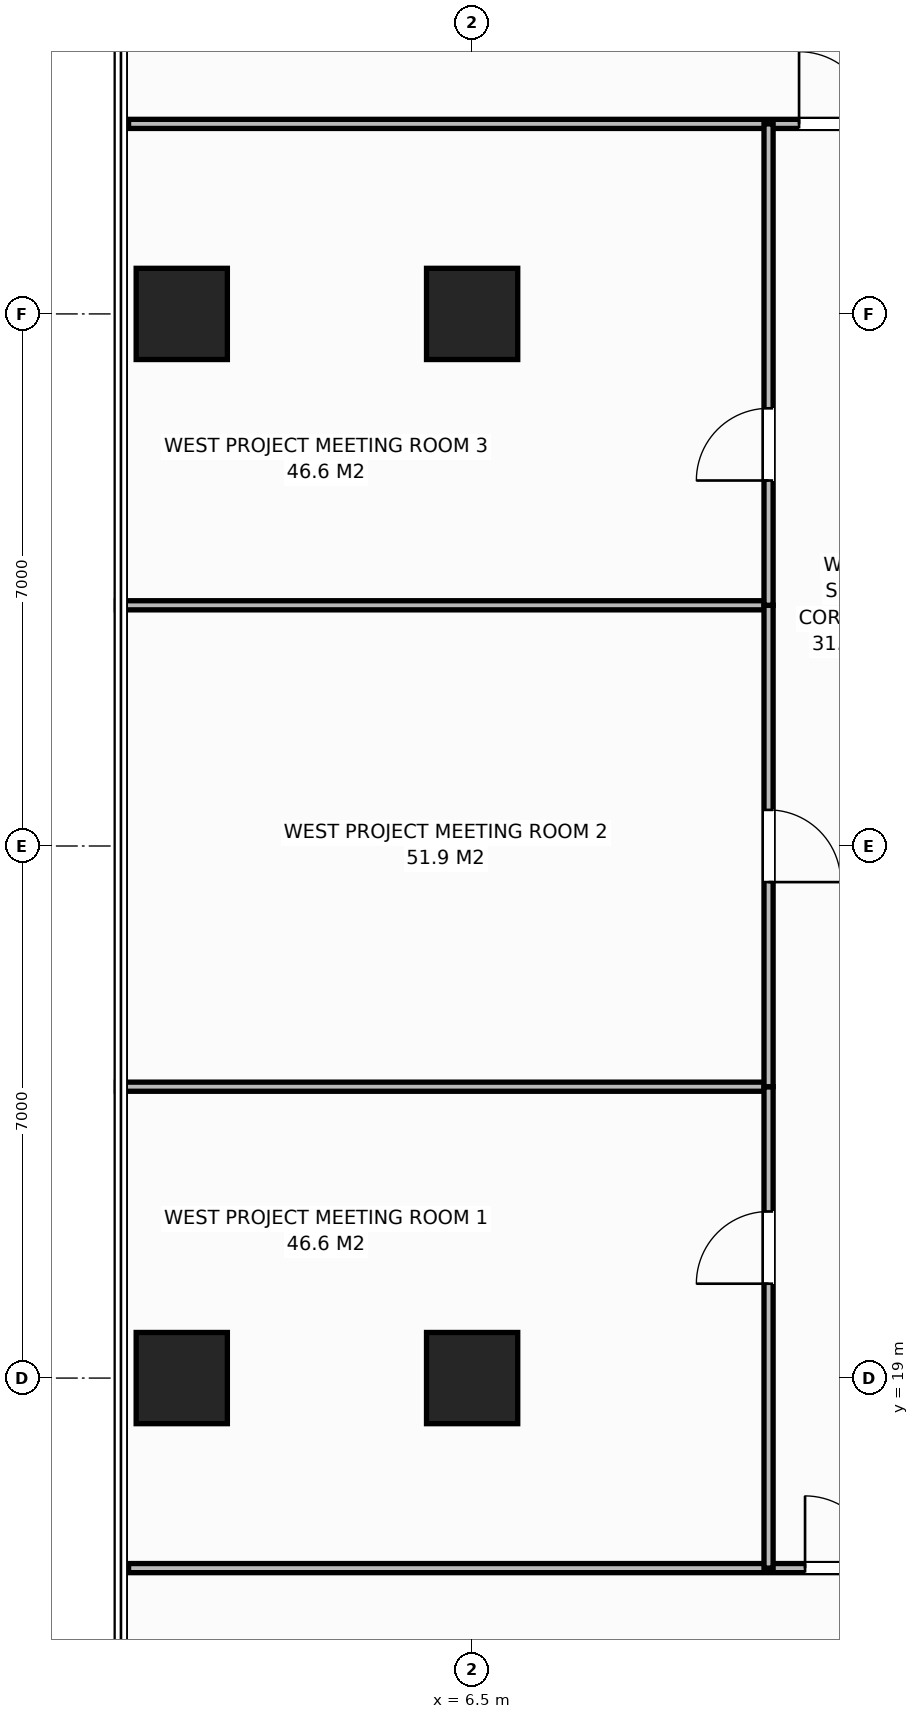
"""IFC4 building model, lengths in metres.
Left out: names, types, materials, properties, quantities, classifications, styles, units other than length and angle.
Written with IfcOpenShell. Run it as: python <this file> out.ifc"""

import sys

from ifc_helpers import new_model, si_unit, direction, frame, frame_2d, origin, origin_2d, place, context, subcontext, project, spatial, rectangle, extrude, element, fill, save


model = new_model("IFC4")
c1 = context("Model", 3, precision=1e-05, world=origin(), true_north=direction((0.0, 1.0)))
c2 = subcontext(c1, "Body", "Model", "MODEL_VIEW")
j1 = project(units=[si_unit("LENGTHUNIT", "METRE"), si_unit("PLANEANGLEUNIT", "RADIAN")], contexts=[c1])
p1 = place(None, origin())
s1 = spatial("IfcSite", under=j1, at=p1, CompositionType="ELEMENT")
p2 = place(p1, origin())
s2 = spatial("IfcBuilding", under=s1, at=p2, CompositionType="ELEMENT")
p3 = place(p2, frame((0.0, 0.0, 124.0)))
s3 = spatial("IfcBuildingStorey", under=s2, at=p3, CompositionType="ELEMENT", Elevation=124.0)
for number, where, z_axis, x_axis in (
    (1, (6.5, 19.0, 0.0), (0.0, 0.0, 1.0), (1.0, 0.0, 0.0)),
    (2, (6.5, 33.0, 0.0), (0.0, 0.0, 1.0), (1.0, 0.0, 0.0)),
    (3, (2.68, 19.0, 0.0), (0.0, 0.0, 1.0), (1.0, 0.0, 0.0)),
    (4, (2.68, 33.0, 0.0), (0.0, 0.0, 1.0), (1.0, 0.0, 0.0)),
):
    element("IfcColumn", number, at=place(p3, frame(where, z_axis=z_axis, x_axis=x_axis)), inside=s3, PredefinedType="COLUMN", context=c2, shape_type="SweptSolid", body=[
        extrude(rectangle(XDim=1.2, YDim=1.2, at=origin_2d()), origin(), (0.0, 0.0, 1.0), 3.8),
    ])
p4 = place(p3, frame((1.98, 35.5, 0.0), z_axis=(0.0, 0.0, 1.0), x_axis=(1.0, 0.0, 0.0)))
e5 = element("IfcWall", 5, at=p4, inside=s3, PredefinedType="PARTITIONING", context=c2, shape_type="SweptSolid", body=[
    extrude(rectangle(XDim=10.172, YDim=0.12, at=frame_2d((5.086, 0.0))), origin(), (0.0, 0.0, 1.0), 3.565),
])
p5 = place(p4, frame((8.821, 0.0, 0.0)))
e6 = element("IfcOpeningElement", 6, at=p5, cuts=e5, PredefinedType="OPENING", context=c2, shape_type="SweptSolid", body=[
    extrude(rectangle(XDim=0.95, YDim=2.15, at=frame_2d((0.475, 1.075))), frame((0.0, 0.07, 0.0), z_axis=(0.0, -1.0, 0.0), x_axis=(1.0, 0.0, 0.0)), (0.0, 0.0, 1.0), 0.14),
])
p6 = place(p3, frame((1.98, 16.5, 0.0), z_axis=(0.0, 0.0, 1.0), x_axis=(1.0, 0.0, 0.0)))
e7 = element("IfcWall", 7, at=p6, inside=s3, PredefinedType="PARTITIONING", context=c2, shape_type="SweptSolid", body=[
    extrude(rectangle(XDim=11.16, YDim=0.12, at=frame_2d((5.58, 0.0))), origin(), (0.0, 0.0, 1.0), 3.565),
])
p7 = place(p6, frame((8.9, 0.0, 0.0)))
e8 = element("IfcOpeningElement", 8, at=p7, cuts=e7, PredefinedType="OPENING", context=c2, shape_type="SweptSolid", body=[
    extrude(rectangle(XDim=0.95, YDim=2.15, at=frame_2d((0.475, 1.075))), frame((0.0, 0.07, 0.0), z_axis=(0.0, -1.0, 0.0), x_axis=(1.0, 0.0, 0.0)), (0.0, 0.0, 1.0), 0.14),
])
p8 = place(p3, frame((1.82, 22.833, 0.0), z_axis=(0.0, 0.0, 1.0), x_axis=(1.0, 0.0, 0.0)))
e9 = element("IfcWall", 9, at=p8, inside=s3, PredefinedType="PARTITIONING", context=c2, shape_type="SweptSolid", body=[
    extrude(rectangle(XDim=8.58, YDim=0.12, at=frame_2d((4.29, 0.0))), origin(), (0.0, 0.0, 1.0), 3.565),
])
p9 = place(p3, frame((10.4, 16.5, 0.0), z_axis=(0.0, 0.0, 1.0), x_axis=(0.0, 1.0, 0.0)))
e10 = element("IfcWall", 10, at=p9, inside=s3, PredefinedType="PARTITIONING", context=c2, shape_type="SweptSolid", body=[
    extrude(rectangle(XDim=6.333, YDim=0.12, at=frame_2d((3.167, 0.0))), origin(), (0.0, 0.0, 1.0), 3.565),
])
p10 = place(p9, frame((3.742, 0.0, 0.0)))
e11 = element("IfcOpeningElement", 11, at=p10, cuts=e10, PredefinedType="OPENING", context=c2, shape_type="SweptSolid", body=[
    extrude(rectangle(XDim=0.95, YDim=2.15, at=frame_2d((0.475, 1.075))), frame((0.0, 0.07, 0.0), z_axis=(0.0, -1.0, 0.0), x_axis=(1.0, 0.0, 0.0)), (0.0, 0.0, 1.0), 0.14),
])
p11 = place(p3, frame((1.82, 29.167, 0.0), z_axis=(0.0, 0.0, 1.0), x_axis=(1.0, 0.0, 0.0)))
e12 = element("IfcWall", 12, at=p11, inside=s3, PredefinedType="PARTITIONING", context=c2, shape_type="SweptSolid", body=[
    extrude(rectangle(XDim=8.58, YDim=0.12, at=frame_2d((4.29, 0.0))), origin(), (0.0, 0.0, 1.0), 3.565),
])
p12 = place(p3, frame((10.4, 22.833, 0.0), z_axis=(0.0, 0.0, 1.0), x_axis=(0.0, 1.0, 0.0)))
e13 = element("IfcWall", 13, at=p12, inside=s3, PredefinedType="PARTITIONING", context=c2, shape_type="SweptSolid", body=[
    extrude(rectangle(XDim=6.333, YDim=0.12, at=frame_2d((3.167, 0.0))), origin(), (0.0, 0.0, 1.0), 3.565),
])
p13 = place(p12, frame((2.692, 0.0, 0.0)))
e14 = element("IfcOpeningElement", 14, at=p13, cuts=e13, PredefinedType="OPENING", context=c2, shape_type="SweptSolid", body=[
    extrude(rectangle(XDim=0.95, YDim=2.15, at=frame_2d((0.475, 1.075))), frame((0.0, 0.07, 0.0), z_axis=(0.0, -1.0, 0.0), x_axis=(1.0, 0.0, 0.0)), (0.0, 0.0, 1.0), 0.14),
])
p14 = place(p3, frame((10.4, 29.167, 0.0), z_axis=(0.0, 0.0, 1.0), x_axis=(0.0, 1.0, 0.0)))
e15 = element("IfcWall", 15, at=p14, inside=s3, PredefinedType="PARTITIONING", context=c2, shape_type="SweptSolid", body=[
    extrude(rectangle(XDim=6.333, YDim=0.12, at=frame_2d((3.167, 0.0))), origin(), (0.0, 0.0, 1.0), 3.565),
])
p15 = place(p14, frame((1.642, 0.0, 0.0)))
e16 = element("IfcOpeningElement", 16, at=p15, cuts=e15, PredefinedType="OPENING", context=c2, shape_type="SweptSolid", body=[
    extrude(rectangle(XDim=0.95, YDim=2.15, at=frame_2d((0.475, 1.075))), frame((0.0, 0.07, 0.0), z_axis=(0.0, -1.0, 0.0), x_axis=(1.0, 0.0, 0.0)), (0.0, 0.0, 1.0), 0.14),
])
p16 = place(p5, origin())
e17 = element("IfcDoor", 17, at=p16, inside=s3, OperationType="SINGLE_SWING_LEFT", PredefinedType="DOOR", context=c2, shape_type="SweptSolid", body=[
    extrude(rectangle(XDim=0.95, YDim=2.15, at=frame_2d((0.475, 1.075))), frame((0.0, 0.025, 0.0), z_axis=(0.0, -1.0, 0.0), x_axis=(1.0, 0.0, 0.0)), (0.0, 0.0, 1.0), 0.05),
])
fill(e6, e17)
p17 = place(p7, origin())
e18 = element("IfcDoor", 18, at=p17, inside=s3, OperationType="SINGLE_SWING_LEFT", PredefinedType="DOOR", context=c2, shape_type="SweptSolid", body=[
    extrude(rectangle(XDim=0.95, YDim=2.15, at=frame_2d((0.475, 1.075))), frame((0.0, 0.025, 0.0), z_axis=(0.0, -1.0, 0.0), x_axis=(1.0, 0.0, 0.0)), (0.0, 0.0, 1.0), 0.05),
])
fill(e8, e18)
p18 = place(p10, origin())
e19 = element("IfcDoor", 19, at=p18, inside=s3, OperationType="SINGLE_SWING_LEFT", PredefinedType="DOOR", context=c2, shape_type="SweptSolid", body=[
    extrude(rectangle(XDim=0.95, YDim=2.15, at=frame_2d((0.475, 1.075))), frame((0.0, 0.025, 0.0), z_axis=(0.0, -1.0, 0.0), x_axis=(1.0, 0.0, 0.0)), (0.0, 0.0, 1.0), 0.05),
])
fill(e11, e19)
p19 = place(p13, origin())
e20 = element("IfcDoor", 20, at=p19, inside=s3, OperationType="SINGLE_SWING_RIGHT", PredefinedType="DOOR", context=c2, shape_type="SweptSolid", body=[
    extrude(rectangle(XDim=0.95, YDim=2.15, at=frame_2d((0.475, 1.075))), frame((0.0, 0.025, 0.0), z_axis=(0.0, -1.0, 0.0), x_axis=(1.0, 0.0, 0.0)), (0.0, 0.0, 1.0), 0.05),
])
fill(e14, e20)
p20 = place(p15, origin())
e21 = element("IfcDoor", 21, at=p20, inside=s3, OperationType="SINGLE_SWING_LEFT", PredefinedType="DOOR", context=c2, shape_type="SweptSolid", body=[
    extrude(rectangle(XDim=0.95, YDim=2.15, at=frame_2d((0.475, 1.075))), frame((0.0, 0.025, 0.0), z_axis=(0.0, -1.0, 0.0), x_axis=(1.0, 0.0, 0.0)), (0.0, 0.0, 1.0), 0.05),
])
fill(e16, e21)
save(model, sys.argv[1])
